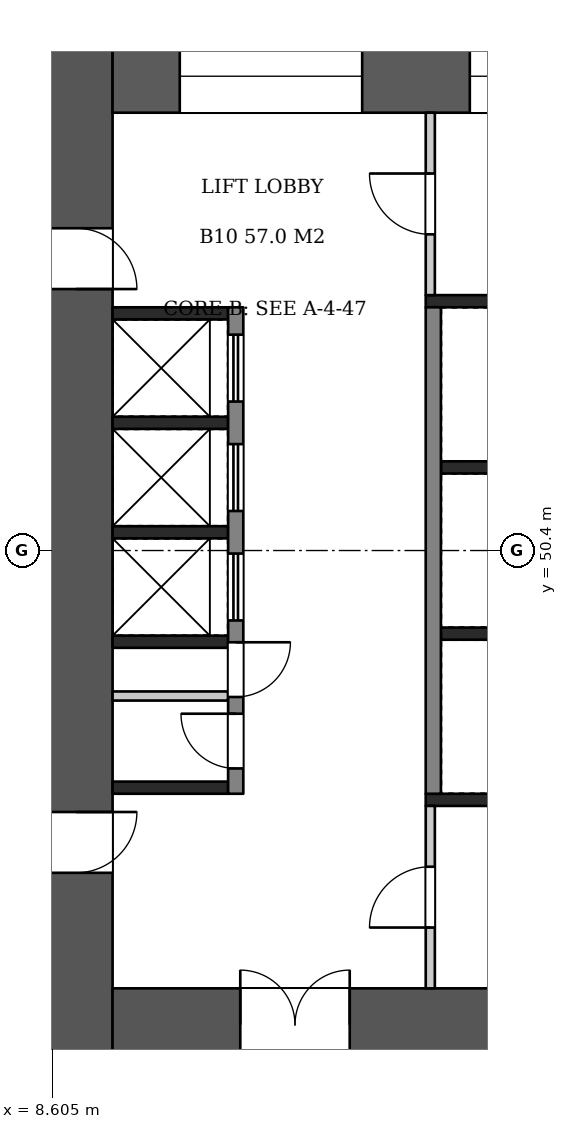
"""IFC4 building model, lengths in metres.
Left out: names, types, materials, properties, quantities, classifications, styles, units other than length and angle.
Written with IfcOpenShell. Run it as: python <this file> out.ifc"""

import sys

from ifc_helpers import new_model, si_unit, direction, frame, frame_2d, origin, place, context, subcontext, project, spatial, rectangle, extrude, element, fill, save


model = new_model("IFC4")
c1 = context("Model", 3, precision=1e-05, world=origin(), true_north=direction((0.0, 1.0)))
c2 = subcontext(c1, "Body", "Model", "MODEL_VIEW")
j1 = project(units=[si_unit("LENGTHUNIT", "METRE"), si_unit("PLANEANGLEUNIT", "RADIAN")], contexts=[c1])
p1 = place(None, origin())
s1 = spatial("IfcSite", under=j1, at=p1, CompositionType="ELEMENT")
p2 = place(p1, origin())
s2 = spatial("IfcBuilding", under=s1, at=p2, CompositionType="ELEMENT")
p3 = place(p2, frame((0.0, 0.0, 46.2)))
s3 = spatial("IfcBuildingStorey", under=s2, at=p3, CompositionType="ELEMENT", Elevation=46.2)
p4 = place(p3, frame((9.0, 58.8, 0.0), z_axis=(0.0, 0.0, 1.0), x_axis=(0.0, -1.0, 0.0)))
e1 = element("IfcWall", 1, at=p4, inside=s3, PredefinedType="SHEAR", context=c2, shape_type="SweptSolid", body=[
    extrude(rectangle(XDim=16.8, YDim=1.2, at=frame_2d((8.4, 0.0))), origin(), (0.0, 0.0, 1.0), 3.22),
])
p5 = place(p4, frame((3.1, 0.0, 0.0)))
e2 = element("IfcOpeningElement", 2, at=p5, cuts=e1, PredefinedType="OPENING", context=c2, shape_type="SweptSolid", body=[
    extrude(rectangle(XDim=1.0, YDim=2.1, at=frame_2d((0.5, 1.05))), frame((0.0, 0.61, 0.0), z_axis=(0.0, -1.0, 0.0), x_axis=(1.0, 0.0, 0.0)), (0.0, 0.0, 1.0), 1.22),
])
p6 = place(p4, frame((12.7, 0.0, 0.0)))
e3 = element("IfcOpeningElement", 3, at=p6, cuts=e1, PredefinedType="OPENING", context=c2, shape_type="SweptSolid", body=[
    extrude(rectangle(XDim=1.0, YDim=2.1, at=frame_2d((0.5, 1.05))), frame((0.0, 0.61, 0.0), z_axis=(0.0, -1.0, 0.0), x_axis=(1.0, 0.0, 0.0)), (0.0, 0.0, 1.0), 1.22),
])
p7 = place(p3, frame((9.6, 58.2, 0.0), z_axis=(0.0, 0.0, 1.0), x_axis=(1.0, 0.0, 0.0)))
e4 = element("IfcWall", 4, at=p7, inside=s3, PredefinedType="SHEAR", context=c2, shape_type="SweptSolid", body=[
    extrude(rectangle(XDim=14.4, YDim=1.2, at=frame_2d((7.2, 0.0))), origin(), (0.0, 0.0, 1.0), 3.22),
])
p8 = place(p7, frame((1.105, 0.0, 0.6)))
e5 = element("IfcOpeningElement", 5, at=p8, cuts=e4, PredefinedType="OPENING", context=c2, shape_type="SweptSolid", body=[
    extrude(rectangle(XDim=3.0, YDim=2.1, at=frame_2d((1.5, 1.05))), frame((0.0, 0.61, 0.0), z_axis=(0.0, -1.0, 0.0), x_axis=(1.0, 0.0, 0.0)), (0.0, 0.0, 1.0), 1.22),
])
p9 = place(p7, frame((5.875, 0.0, 0.6)))
e6 = element("IfcOpeningElement", 6, at=p9, cuts=e4, PredefinedType="OPENING", context=c2, shape_type="SweptSolid", body=[
    extrude(rectangle(XDim=2.4, YDim=2.1, at=frame_2d((1.2, 1.05))), frame((0.0, 0.61, 0.0), z_axis=(0.0, -1.0, 0.0), x_axis=(1.0, 0.0, 0.0)), (0.0, 0.0, 1.0), 1.22),
])
p10 = place(p7, frame((9.993, 0.0, 0.5)))
e7 = element("IfcOpeningElement", 7, at=p10, cuts=e4, PredefinedType="OPENING", context=c2, shape_type="SweptSolid", body=[
    extrude(rectangle(XDim=1.2, YDim=2.4, at=frame_2d((0.6, 1.2))), frame((0.0, 0.61, 0.0), z_axis=(0.0, -1.0, 0.0), x_axis=(1.0, 0.0, 0.0)), (0.0, 0.0, 1.0), 1.22),
])
p11 = place(p7, frame((12.197, 0.0, 0.5)))
e8 = element("IfcOpeningElement", 8, at=p11, cuts=e4, PredefinedType="OPENING", context=c2, shape_type="SweptSolid", body=[
    extrude(rectangle(XDim=1.2, YDim=2.4, at=frame_2d((0.6, 1.2))), frame((0.0, 0.61, 0.0), z_axis=(0.0, -1.0, 0.0), x_axis=(1.0, 0.0, 0.0)), (0.0, 0.0, 1.0), 1.22),
])
p12 = place(p3, frame((9.6, 42.6, 0.0), z_axis=(0.0, 0.0, 1.0), x_axis=(1.0, 0.0, 0.0)))
e9 = element("IfcWall", 9, at=p12, inside=s3, PredefinedType="SHEAR", context=c2, shape_type="SweptSolid", body=[
    extrude(rectangle(XDim=14.4, YDim=1.2, at=frame_2d((7.2, 0.0))), origin(), (0.0, 0.0, 1.0), 3.22),
])
p13 = place(p12, frame((2.1, 0.0, 0.0)))
e10 = element("IfcOpeningElement", 10, at=p13, cuts=e9, PredefinedType="OPENING", context=c2, shape_type="SweptSolid", body=[
    extrude(rectangle(XDim=1.8, YDim=2.1, at=frame_2d((0.9, 1.05))), frame((0.0, 0.61, 0.0), z_axis=(0.0, -1.0, 0.0), x_axis=(1.0, 0.0, 0.0)), (0.0, 0.0, 1.0), 1.22),
])
for number, where, z_axis, x_axis in (
    (11, (9.6, 54.3, 0.0), (0.0, 0.0, 1.0), (1.0, 0.0, 0.0)),
    (12, (9.6, 52.5, 0.0), (0.0, 0.0, 1.0), (1.0, 0.0, 0.0)),
    (13, (9.6, 50.7, 0.0), (0.0, 0.0, 1.0), (1.0, 0.0, 0.0)),
    (14, (9.6, 48.9, 0.0), (0.0, 0.0, 1.0), (1.0, 0.0, 0.0)),
    (15, (9.6, 46.5, 0.0), (0.0, 0.0, 1.0), (1.0, 0.0, 0.0)),
):
    element("IfcWall", number, at=place(p3, frame(where, z_axis=z_axis, x_axis=x_axis)), inside=s3, PredefinedType="SHEAR", context=c2, shape_type="SweptSolid", body=[
        extrude(rectangle(XDim=1.9, YDim=0.2, at=frame_2d((0.95, 0.0))), origin(), (0.0, 0.0, 1.0), 3.22),
    ])
p14 = place(p3, frame((9.6, 48.008, 0.0), z_axis=(0.0, 0.0, 1.0), x_axis=(1.0, 0.0, 0.0)))
e16 = element("IfcWall", 16, at=p14, inside=s3, PredefinedType="PARTITIONING", context=c2, shape_type="SweptSolid", body=[
    extrude(rectangle(XDim=1.9, YDim=0.15, at=frame_2d((0.95, 0.0))), origin(), (0.0, 0.0, 1.0), 3.22),
])
p15 = place(p3, frame((11.625, 54.4, 0.0), z_axis=(0.0, 0.0, 1.0), x_axis=(0.0, -1.0, 0.0)))
e17 = element("IfcWall", 17, at=p15, inside=s3, PredefinedType="SHEAR", context=c2, shape_type="SweptSolid", body=[
    extrude(rectangle(XDim=8.0, YDim=0.25, at=frame_2d((4.0, 0.0))), origin(), (0.0, 0.0, 1.0), 3.22),
])
p16 = place(p15, frame((0.45, 0.0, 0.0)))
e18 = element("IfcOpeningElement", 18, at=p16, cuts=e17, PredefinedType="OPENING", context=c2, shape_type="SweptSolid", body=[
    extrude(rectangle(XDim=1.1, YDim=2.1, at=frame_2d((0.55, 1.05))), frame((0.0, 0.135, 0.0), z_axis=(0.0, -1.0, 0.0), x_axis=(1.0, 0.0, 0.0)), (0.0, 0.0, 1.0), 0.27),
])
p17 = place(p15, frame((2.25, 0.0, 0.0)))
e19 = element("IfcOpeningElement", 19, at=p17, cuts=e17, PredefinedType="OPENING", context=c2, shape_type="SweptSolid", body=[
    extrude(rectangle(XDim=1.1, YDim=2.1, at=frame_2d((0.55, 1.05))), frame((0.0, 0.135, 0.0), z_axis=(0.0, -1.0, 0.0), x_axis=(1.0, 0.0, 0.0)), (0.0, 0.0, 1.0), 0.27),
])
p18 = place(p15, frame((4.05, 0.0, 0.0)))
e20 = element("IfcOpeningElement", 20, at=p18, cuts=e17, PredefinedType="OPENING", context=c2, shape_type="SweptSolid", body=[
    extrude(rectangle(XDim=1.1, YDim=2.1, at=frame_2d((0.55, 1.05))), frame((0.0, 0.135, 0.0), z_axis=(0.0, -1.0, 0.0), x_axis=(1.0, 0.0, 0.0)), (0.0, 0.0, 1.0), 0.27),
])
p19 = place(p15, frame((5.509, 0.0, 0.0)))
e21 = element("IfcOpeningElement", 21, at=p19, cuts=e17, PredefinedType="OPENING", context=c2, shape_type="SweptSolid", body=[
    extrude(rectangle(XDim=0.9, YDim=2.1, at=frame_2d((0.45, 1.05))), frame((0.0, 0.135, 0.0), z_axis=(0.0, -1.0, 0.0), x_axis=(1.0, 0.0, 0.0)), (0.0, 0.0, 1.0), 0.27),
])
p20 = place(p15, frame((6.684, 0.0, 0.0)))
e22 = element("IfcOpeningElement", 22, at=p20, cuts=e17, PredefinedType="OPENING", context=c2, shape_type="SweptSolid", body=[
    extrude(rectangle(XDim=0.9, YDim=2.1, at=frame_2d((0.45, 1.05))), frame((0.0, 0.135, 0.0), z_axis=(0.0, -1.0, 0.0), x_axis=(1.0, 0.0, 0.0)), (0.0, 0.0, 1.0), 0.27),
])
for number, where, z_axis, x_axis in (
    (23, (15.0, 51.767, 0.0), (0.0, 0.0, 1.0), (1.0, 0.0, 0.0)),
    (24, (15.0, 49.033, 0.0), (0.0, 0.0, 1.0), (1.0, 0.0, 0.0)),
):
    element("IfcWall", number, at=place(p3, frame(where, z_axis=z_axis, x_axis=x_axis)), inside=s3, PredefinedType="SHEAR", context=c2, shape_type="SweptSolid", body=[
        extrude(rectangle(XDim=1.9, YDim=0.2, at=frame_2d((0.95, 0.0))), origin(), (0.0, 0.0, 1.0), 3.22),
    ])
p21 = place(p3, frame((14.875, 54.4, 0.0), z_axis=(0.0, 0.0, 1.0), x_axis=(0.0, -1.0, 0.0)))
e25 = element("IfcWall", 25, at=p21, inside=s3, PredefinedType="SHEAR", context=c2, shape_type="SweptSolid", body=[
    extrude(rectangle(XDim=8.0, YDim=0.25, at=frame_2d((4.0, 0.0))), origin(), (0.0, 0.0, 1.0), 3.22),
])
p22 = place(p3, frame((14.75, 54.5, 0.0), z_axis=(0.0, 0.0, 1.0), x_axis=(1.0, 0.0, 0.0)))
e26 = element("IfcWall", 26, at=p22, inside=s3, PredefinedType="SHEAR", context=c2, shape_type="SweptSolid", body=[
    extrude(rectangle(XDim=2.4, YDim=0.2, at=frame_2d((1.2, 0.0))), origin(), (0.0, 0.0, 1.0), 3.22),
])
p23 = place(p3, frame((14.825, 57.6, 0.0), z_axis=(0.0, 0.0, 1.0), x_axis=(0.0, -1.0, 0.0)))
e27 = element("IfcWall", 27, at=p23, inside=s3, PredefinedType="PARTITIONING", context=c2, shape_type="SweptSolid", body=[
    extrude(rectangle(XDim=3.0, YDim=0.15, at=frame_2d((1.5, 0.0))), origin(), (0.0, 0.0, 1.0), 3.22),
])
p24 = place(p23, frame((1.0, 0.0, 0.0)))
e28 = element("IfcOpeningElement", 28, at=p24, cuts=e27, PredefinedType="OPENING", context=c2, shape_type="SweptSolid", body=[
    extrude(rectangle(XDim=1.0, YDim=2.1, at=frame_2d((0.5, 1.05))), frame((0.0, 0.085, 0.0), z_axis=(0.0, -1.0, 0.0), x_axis=(1.0, 0.0, 0.0)), (0.0, 0.0, 1.0), 0.17),
])
p25 = place(p3, frame((14.75, 46.3, 0.0), z_axis=(0.0, 0.0, 1.0), x_axis=(1.0, 0.0, 0.0)))
e29 = element("IfcWall", 29, at=p25, inside=s3, PredefinedType="SHEAR", context=c2, shape_type="SweptSolid", body=[
    extrude(rectangle(XDim=2.4, YDim=0.2, at=frame_2d((1.2, 0.0))), origin(), (0.0, 0.0, 1.0), 3.22),
])
p26 = place(p3, frame((14.825, 46.2, 0.0), z_axis=(0.0, 0.0, 1.0), x_axis=(0.0, -1.0, 0.0)))
e30 = element("IfcWall", 30, at=p26, inside=s3, PredefinedType="PARTITIONING", context=c2, shape_type="SweptSolid", body=[
    extrude(rectangle(XDim=3.0, YDim=0.15, at=frame_2d((1.5, 0.0))), origin(), (0.0, 0.0, 1.0), 3.22),
])
p27 = place(p26, frame((1.0, 0.0, 0.0)))
e31 = element("IfcOpeningElement", 31, at=p27, cuts=e30, PredefinedType="OPENING", context=c2, shape_type="SweptSolid", body=[
    extrude(rectangle(XDim=1.0, YDim=2.1, at=frame_2d((0.5, 1.05))), frame((0.0, 0.085, 0.0), z_axis=(0.0, -1.0, 0.0), x_axis=(1.0, 0.0, 0.0)), (0.0, 0.0, 1.0), 0.17),
])
p28 = place(p5, origin())
e32 = element("IfcDoor", 32, at=p28, inside=s3, OperationType="SINGLE_SWING_RIGHT", PredefinedType="DOOR", context=c2, shape_type="SweptSolid", body=[
    extrude(rectangle(XDim=1.0, YDim=2.1, at=frame_2d((0.5, 1.05))), frame((0.0, 0.025, 0.0), z_axis=(0.0, -1.0, 0.0), x_axis=(1.0, 0.0, 0.0)), (0.0, 0.0, 1.0), 0.05),
])
fill(e2, e32)
p29 = place(p6, origin())
e33 = element("IfcDoor", 33, at=p29, inside=s3, OperationType="SINGLE_SWING_LEFT", PredefinedType="DOOR", context=c2, shape_type="SweptSolid", body=[
    extrude(rectangle(XDim=1.0, YDim=2.1, at=frame_2d((0.5, 1.05))), frame((0.0, 0.025, 0.0), z_axis=(0.0, -1.0, 0.0), x_axis=(1.0, 0.0, 0.0)), (0.0, 0.0, 1.0), 0.05),
])
fill(e3, e33)
p30 = place(p13, origin())
e34 = element("IfcDoor", 34, at=p30, inside=s3, OperationType="DOUBLE_DOOR_SINGLE_SWING", PredefinedType="DOOR", context=c2, shape_type="SweptSolid", body=[
    extrude(rectangle(XDim=1.8, YDim=2.1, at=frame_2d((0.9, 1.05))), frame((0.0, 0.025, 0.0), z_axis=(0.0, -1.0, 0.0), x_axis=(1.0, 0.0, 0.0)), (0.0, 0.0, 1.0), 0.05),
])
fill(e10, e34)
p31 = place(p16, origin())
e35 = element("IfcDoor", 35, at=p31, inside=s3, OperationType="DOUBLE_DOOR_SLIDING", PredefinedType="DOOR", context=c2, shape_type="SweptSolid", body=[
    extrude(rectangle(XDim=1.1, YDim=2.1, at=frame_2d((0.55, 1.05))), frame((0.0, 0.025, 0.0), z_axis=(0.0, -1.0, 0.0), x_axis=(1.0, 0.0, 0.0)), (0.0, 0.0, 1.0), 0.05),
])
fill(e18, e35)
p32 = place(p17, origin())
e36 = element("IfcDoor", 36, at=p32, inside=s3, OperationType="DOUBLE_DOOR_SLIDING", PredefinedType="DOOR", context=c2, shape_type="SweptSolid", body=[
    extrude(rectangle(XDim=1.1, YDim=2.1, at=frame_2d((0.55, 1.05))), frame((0.0, 0.025, 0.0), z_axis=(0.0, -1.0, 0.0), x_axis=(1.0, 0.0, 0.0)), (0.0, 0.0, 1.0), 0.05),
])
fill(e19, e36)
p33 = place(p18, origin())
e37 = element("IfcDoor", 37, at=p33, inside=s3, OperationType="DOUBLE_DOOR_SLIDING", PredefinedType="DOOR", context=c2, shape_type="SweptSolid", body=[
    extrude(rectangle(XDim=1.1, YDim=2.1, at=frame_2d((0.55, 1.05))), frame((0.0, 0.025, 0.0), z_axis=(0.0, -1.0, 0.0), x_axis=(1.0, 0.0, 0.0)), (0.0, 0.0, 1.0), 0.05),
])
fill(e20, e37)
p34 = place(p19, origin())
e38 = element("IfcDoor", 38, at=p34, inside=s3, OperationType="SINGLE_SWING_LEFT", PredefinedType="DOOR", context=c2, shape_type="SweptSolid", body=[
    extrude(rectangle(XDim=0.9, YDim=2.1, at=frame_2d((0.45, 1.05))), frame((0.0, 0.025, 0.0), z_axis=(0.0, -1.0, 0.0), x_axis=(1.0, 0.0, 0.0)), (0.0, 0.0, 1.0), 0.05),
])
fill(e21, e38)
p35 = place(p20, frame((0.9, 0.0, 0.0), z_axis=(0.0, 0.0, 1.0), x_axis=(-1.0, 0.0, 0.0)))
e39 = element("IfcDoor", 39, at=p35, inside=s3, OperationType="SINGLE_SWING_RIGHT", PredefinedType="DOOR", context=c2, shape_type="SweptSolid", body=[
    extrude(rectangle(XDim=0.9, YDim=2.1, at=frame_2d((0.45, 1.05))), frame((0.0, 0.025, 0.0), z_axis=(0.0, -1.0, 0.0), x_axis=(1.0, 0.0, 0.0)), (0.0, 0.0, 1.0), 0.05),
])
fill(e22, e39)
p36 = place(p24, frame((1.0, 0.0, 0.0), z_axis=(0.0, 0.0, 1.0), x_axis=(-1.0, 0.0, 0.0)))
e40 = element("IfcDoor", 40, at=p36, inside=s3, OperationType="SINGLE_SWING_RIGHT", PredefinedType="DOOR", context=c2, shape_type="SweptSolid", body=[
    extrude(rectangle(XDim=1.0, YDim=2.1, at=frame_2d((0.5, 1.05))), frame((0.0, 0.025, 0.0), z_axis=(0.0, -1.0, 0.0), x_axis=(1.0, 0.0, 0.0)), (0.0, 0.0, 1.0), 0.05),
])
fill(e28, e40)
p37 = place(p27, frame((1.0, 0.0, 0.0), z_axis=(0.0, 0.0, 1.0), x_axis=(-1.0, 0.0, 0.0)))
e41 = element("IfcDoor", 41, at=p37, inside=s3, OperationType="SINGLE_SWING_LEFT", PredefinedType="DOOR", context=c2, shape_type="SweptSolid", body=[
    extrude(rectangle(XDim=1.0, YDim=2.1, at=frame_2d((0.5, 1.05))), frame((0.0, 0.025, 0.0), z_axis=(0.0, -1.0, 0.0), x_axis=(1.0, 0.0, 0.0)), (0.0, 0.0, 1.0), 0.05),
])
fill(e31, e41)
p38 = place(p8, origin())
e42 = element("IfcWindow", 42, at=p38, inside=s3, PartitioningType="SINGLE_PANEL", PredefinedType="WINDOW", context=c2, shape_type="SweptSolid", body=[
    extrude(rectangle(XDim=3.0, YDim=2.1, at=frame_2d((1.5, 1.05))), frame((0.0, 0.03, 0.0), z_axis=(0.0, -1.0, 0.0), x_axis=(1.0, 0.0, 0.0)), (0.0, 0.0, 1.0), 0.06),
])
fill(e5, e42)
p39 = place(p9, origin())
e43 = element("IfcWindow", 43, at=p39, inside=s3, PartitioningType="SINGLE_PANEL", PredefinedType="WINDOW", context=c2, shape_type="SweptSolid", body=[
    extrude(rectangle(XDim=2.4, YDim=2.1, at=frame_2d((1.2, 1.05))), frame((0.0, 0.03, 0.0), z_axis=(0.0, -1.0, 0.0), x_axis=(1.0, 0.0, 0.0)), (0.0, 0.0, 1.0), 0.06),
])
fill(e6, e43)
save(model, sys.argv[1])
